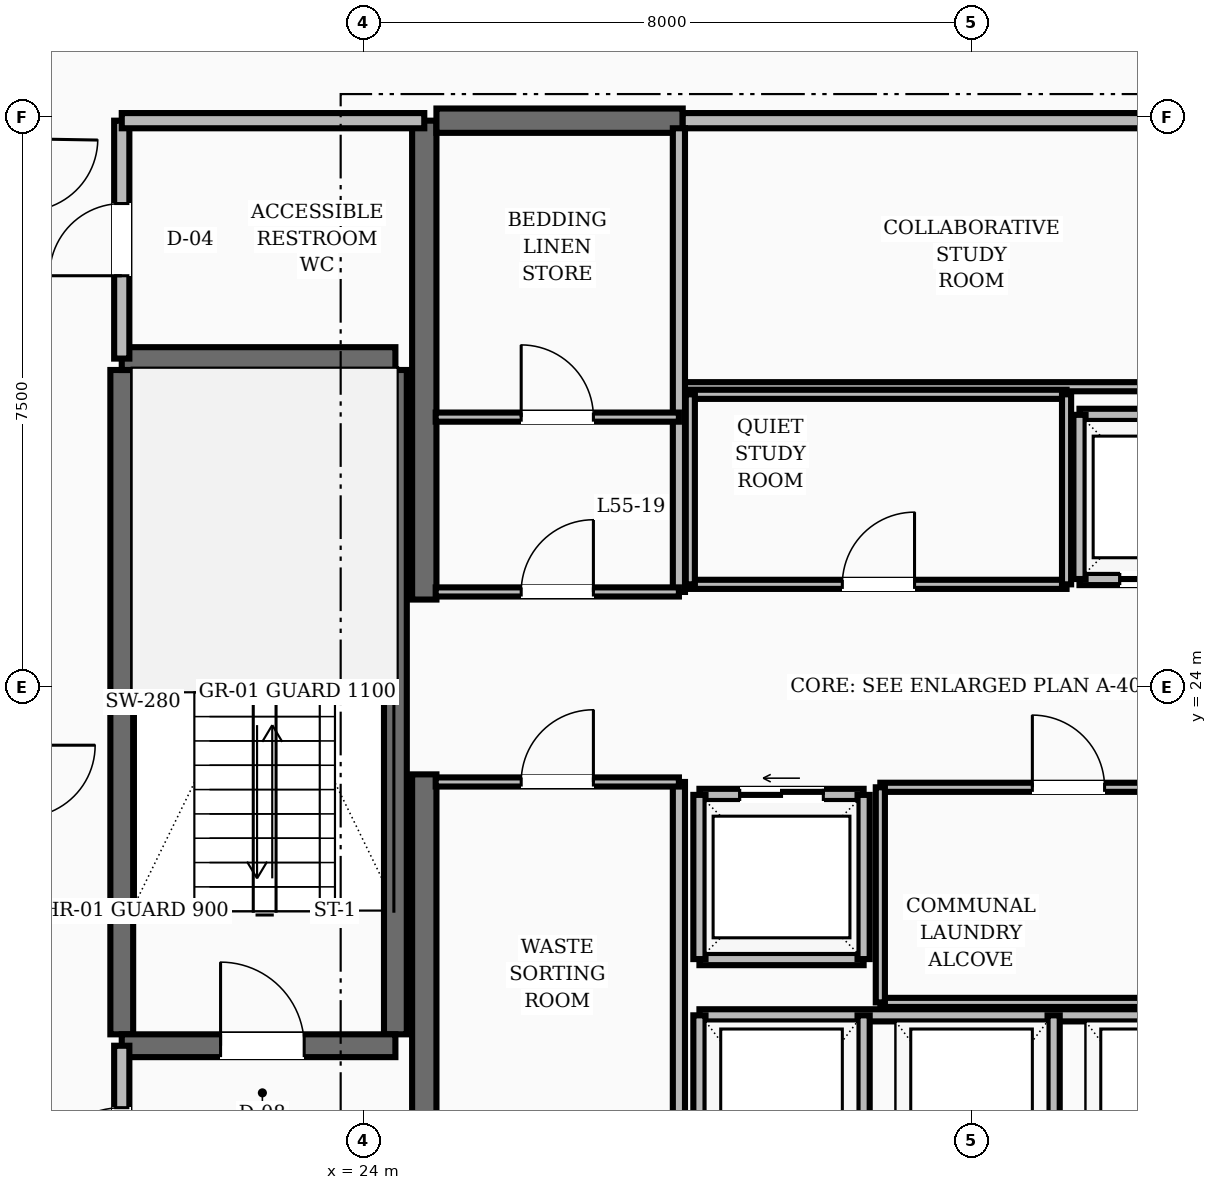
"""IFC4 building model, lengths in metres.
Left out: names, types, materials, properties, quantities, classifications, styles, units other than length and angle.
Written with IfcOpenShell. Run it as: python <this file> out.ifc"""

import sys

from ifc_helpers import new_model, si_unit, direction, frame, frame_2d, origin, place, context, subcontext, project, spatial, rectangle, extrude, element, fill, save


model = new_model("IFC4")
c1 = context("Model", 3, precision=1e-05, world=origin(), true_north=direction((0.0, 1.0)))
c2 = subcontext(c1, "Body", "Model", "MODEL_VIEW")
j1 = project(units=[si_unit("LENGTHUNIT", "METRE"), si_unit("PLANEANGLEUNIT", "RADIAN")], contexts=[c1])
p1 = place(None, origin())
s1 = spatial("IfcSite", under=j1, at=p1, CompositionType="ELEMENT")
p2 = place(p1, origin())
s2 = spatial("IfcBuilding", under=s1, at=p2, CompositionType="ELEMENT")
p3 = place(p2, frame((0.0, 0.0, 214.8)))
s3 = spatial("IfcBuildingStorey", under=s2, at=p3, CompositionType="ELEMENT", Elevation=214.8)
for number, where, z_axis, x_axis in (
    (1, (24.8, 16.55, 0.0), (0.0, 0.0, 1.0), (0.0, 1.0, 0.0)),
    (2, (24.8, 25.15, 0.0), (0.0, 0.0, 1.0), (0.0, 1.0, 0.0)),
):
    element("IfcWall", number, at=place(p3, frame(where, z_axis=z_axis, x_axis=x_axis)), inside=s3, PredefinedType="SHEAR", context=c2, shape_type="SweptSolid", body=[
        extrude(rectangle(XDim=6.3, YDim=0.32, at=frame_2d((3.15, 0.0))), origin(), (0.0, 0.0, 1.0), 3.6),
    ])
p4 = place(p3, frame((24.96, 31.45, 0.0), z_axis=(0.0, 0.0, 1.0), x_axis=(1.0, 0.0, 0.0)))
e3 = element("IfcWall", 3, at=p4, inside=s3, PredefinedType="SHEAR", context=c2, shape_type="SweptSolid", body=[
    extrude(rectangle(XDim=3.24, YDim=0.32, at=frame_2d((1.62, 0.0))), origin(), (0.0, 0.0, 1.0), 3.6),
])
for number, where, z_axis, x_axis in (
    (4, (20.82, 19.43, 0.0), (0.0, 0.0, 1.0), (0.0, 1.0, 0.0)),
    (5, (24.42, 19.43, 0.0), (0.0, 0.0, 1.0), (0.0, 1.0, 0.0)),
):
    element("IfcWall", number, at=place(p3, frame(where, z_axis=z_axis, x_axis=x_axis)), inside=s3, PredefinedType="SHEAR", context=c2, shape_type="SweptSolid", body=[
        extrude(rectangle(XDim=8.74, YDim=0.3, at=frame_2d((4.37, 0.0))), origin(), (0.0, 0.0, 1.0), 3.6),
    ])
p5 = place(p3, frame((20.82, 19.28, 0.0), z_axis=(0.0, 0.0, 1.0), x_axis=(1.0, 0.0, 0.0)))
e6 = element("IfcWall", 6, at=p5, inside=s3, PredefinedType="SHEAR", context=c2, shape_type="SweptSolid", body=[
    extrude(rectangle(XDim=3.6, YDim=0.3, at=frame_2d((1.8, 0.0))), origin(), (0.0, 0.0, 1.0), 3.6),
])
p6 = place(p5, frame((1.3, 0.0, 0.0)))
e7 = element("IfcOpeningElement", 7, at=p6, cuts=e6, PredefinedType="OPENING", context=c2, shape_type="SweptSolid", body=[
    extrude(rectangle(XDim=1.1, YDim=2.1, at=frame_2d((0.55, 1.05))), frame((0.0, 0.16, 0.0), z_axis=(0.0, -1.0, 0.0), x_axis=(1.0, 0.0, 0.0)), (0.0, 0.0, 1.0), 0.32),
])
p7 = place(p3, frame((20.82, 28.32, 0.0), z_axis=(0.0, 0.0, 1.0), x_axis=(1.0, 0.0, 0.0)))
e8 = element("IfcWall", 8, at=p7, inside=s3, PredefinedType="SHEAR", context=c2, shape_type="SweptSolid", body=[
    extrude(rectangle(XDim=3.6, YDim=0.3, at=frame_2d((1.8, 0.0))), origin(), (0.0, 0.0, 1.0), 3.6),
])
p8 = place(p3, frame((20.82, 16.55, 0.0), z_axis=(0.0, 0.0, 1.0), x_axis=(0.0, 1.0, 0.0)))
e9 = element("IfcWall", 9, at=p8, inside=s3, PredefinedType="SOLIDWALL", context=c2, shape_type="SweptSolid", body=[
    extrude(rectangle(XDim=2.73, YDim=0.2, at=frame_2d((1.365, 0.0))), origin(), (0.0, 0.0, 1.0), 2.87),
])
p9 = place(p8, frame((0.815, 0.0, 0.0)))
e10 = element("IfcOpeningElement", 10, at=p9, cuts=e9, PredefinedType="OPENING", context=c2, shape_type="SweptSolid", body=[
    extrude(rectangle(XDim=1.1, YDim=2.1, at=frame_2d((0.55, 1.05))), frame((0.0, 0.11, 0.0), z_axis=(0.0, -1.0, 0.0), x_axis=(1.0, 0.0, 0.0)), (0.0, 0.0, 1.0), 0.22),
])
p10 = place(p3, frame((20.82, 28.32, 0.0), z_axis=(0.0, 0.0, 1.0), x_axis=(0.0, 1.0, 0.0)))
e11 = element("IfcWall", 11, at=p10, inside=s3, PredefinedType="SOLIDWALL", context=c2, shape_type="SweptSolid", body=[
    extrude(rectangle(XDim=3.13, YDim=0.2, at=frame_2d((1.565, 0.0))), origin(), (0.0, 0.0, 1.0), 2.87),
])
p11 = place(p10, frame((1.09, 0.0, 0.0)))
e12 = element("IfcOpeningElement", 12, at=p11, cuts=e11, PredefinedType="OPENING", context=c2, shape_type="SweptSolid", body=[
    extrude(rectangle(XDim=0.95, YDim=2.1, at=frame_2d((0.475, 1.05))), frame((0.0, 0.11, 0.0), z_axis=(0.0, -1.0, 0.0), x_axis=(1.0, 0.0, 0.0)), (0.0, 0.0, 1.0), 0.22),
])
p12 = place(p3, frame((20.82, 31.45, 0.0), z_axis=(0.0, 0.0, 1.0), x_axis=(1.0, 0.0, 0.0)))
e13 = element("IfcWall", 13, at=p12, inside=s3, PredefinedType="SOLIDWALL", context=c2, shape_type="SweptSolid", body=[
    extrude(rectangle(XDim=3.98, YDim=0.2, at=frame_2d((1.99, 0.0))), origin(), (0.0, 0.0, 1.0), 2.87),
])
p13 = place(p3, frame((33.42, 25.42, 0.0), z_axis=(0.0, 0.0, 1.0), x_axis=(1.0, 0.0, 0.0)))
e14 = element("IfcWall", 14, at=p13, inside=s3, PredefinedType="SOLIDWALL", context=c2, shape_type="SweptSolid", body=[
    extrude(rectangle(XDim=2.16, YDim=0.16, at=frame_2d((1.08, 0.0))), origin(), (0.0, 0.0, 1.0), 2.87),
])
p14 = place(p13, frame((0.53, 0.0, 0.0)))
e15 = element("IfcOpeningElement", 15, at=p14, cuts=e14, PredefinedType="OPENING", context=c2, shape_type="SweptSolid", body=[
    extrude(rectangle(XDim=1.1, YDim=2.15, at=frame_2d((0.55, 1.075))), frame((0.0, 0.09, 0.0), z_axis=(0.0, -1.0, 0.0), x_axis=(1.0, 0.0, 0.0)), (0.0, 0.0, 1.0), 0.18),
])
for number, where, z_axis, x_axis in (
    (16, (33.42, 27.58, 0.0), (0.0, 0.0, 1.0), (1.0, 0.0, 0.0)),
    (17, (33.42, 25.42, 0.0), (0.0, 0.0, 1.0), (0.0, 1.0, 0.0)),
):
    element("IfcWall", number, at=place(p3, frame(where, z_axis=z_axis, x_axis=x_axis)), inside=s3, PredefinedType="SOLIDWALL", context=c2, shape_type="SweptSolid", body=[
        extrude(rectangle(XDim=2.16, YDim=0.16, at=frame_2d((1.08, 0.0))), origin(), (0.0, 0.0, 1.0), 2.87),
    ])
p15 = place(p3, frame((28.42, 22.58, 0.0), z_axis=(0.0, 0.0, 1.0), x_axis=(1.0, 0.0, 0.0)))
e18 = element("IfcWall", 18, at=p15, inside=s3, PredefinedType="SOLIDWALL", context=c2, shape_type="SweptSolid", body=[
    extrude(rectangle(XDim=2.16, YDim=0.16, at=frame_2d((1.08, 0.0))), origin(), (0.0, 0.0, 1.0), 2.87),
])
p16 = place(p15, frame((0.53, 0.0, 0.0)))
e19 = element("IfcOpeningElement", 19, at=p16, cuts=e18, PredefinedType="OPENING", context=c2, shape_type="SweptSolid", body=[
    extrude(rectangle(XDim=1.1, YDim=2.15, at=frame_2d((0.55, 1.075))), frame((0.0, 0.09, 0.0), z_axis=(0.0, -1.0, 0.0), x_axis=(1.0, 0.0, 0.0)), (0.0, 0.0, 1.0), 0.18),
])
for number, where, z_axis, x_axis in (
    (20, (28.42, 20.42, 0.0), (0.0, 0.0, 1.0), (1.0, 0.0, 0.0)),
    (21, (28.42, 20.42, 0.0), (0.0, 0.0, 1.0), (0.0, 1.0, 0.0)),
    (22, (30.58, 20.42, 0.0), (0.0, 0.0, 1.0), (0.0, 1.0, 0.0)),
):
    element("IfcWall", number, at=place(p3, frame(where, z_axis=z_axis, x_axis=x_axis)), inside=s3, PredefinedType="SOLIDWALL", context=c2, shape_type="SweptSolid", body=[
        extrude(rectangle(XDim=2.16, YDim=0.16, at=frame_2d((1.08, 0.0))), origin(), (0.0, 0.0, 1.0), 2.87),
    ])
p17 = place(p3, frame((28.42, 19.68, 0.0), z_axis=(0.0, 0.0, 1.0), x_axis=(1.0, 0.0, 0.0)))
e23 = element("IfcWall", 23, at=p17, inside=s3, PredefinedType="SOLIDWALL", context=c2, shape_type="SweptSolid", body=[
    extrude(rectangle(XDim=7.16, YDim=0.16, at=frame_2d((3.58, 0.0))), origin(), (0.0, 0.0, 1.0), 2.87),
])
for number, where, z_axis, x_axis in (
    (24, (28.42, 16.92, 0.0), (0.0, 0.0, 1.0), (0.0, 1.0, 0.0)),
    (25, (30.58, 16.92, 0.0), (0.0, 0.0, 1.0), (0.0, 1.0, 0.0)),
    (26, (33.08, 16.92, 0.0), (0.0, 0.0, 1.0), (0.0, 1.0, 0.0)),
):
    element("IfcWall", number, at=place(p3, frame(where, z_axis=z_axis, x_axis=x_axis)), inside=s3, PredefinedType="SOLIDWALL", context=c2, shape_type="SweptSolid", body=[
        extrude(rectangle(XDim=2.76, YDim=0.16, at=frame_2d((1.38, 0.0))), origin(), (0.0, 0.0, 1.0), 2.87),
    ])
p18 = place(p3, frame((28.2, 31.45, 0.0), z_axis=(0.0, 0.0, 1.0), x_axis=(1.0, 0.0, 0.0)))
e27 = element("IfcWall", 27, at=p18, inside=s3, PredefinedType="SOLIDWALL", context=c2, shape_type="SweptSolid", body=[
    extrude(rectangle(XDim=7.6, YDim=0.2, at=frame_2d((3.8, 0.0))), origin(), (0.0, 0.0, 1.0), 2.87),
])
p19 = place(p3, frame((28.2, 27.95, 0.0), z_axis=(0.0, 0.0, 1.0), x_axis=(1.0, 0.0, 0.0)))
e28 = element("IfcWall", 28, at=p19, inside=s3, PredefinedType="PARTITIONING", context=c2, shape_type="SweptSolid", body=[
    extrude(rectangle(XDim=7.6, YDim=0.12, at=frame_2d((3.8, 0.0))), origin(), (0.0, 0.0, 1.0), 2.87),
])
p20 = place(p3, frame((28.3, 25.35, 0.0), z_axis=(0.0, 0.0, 1.0), x_axis=(1.0, 0.0, 0.0)))
e29 = element("IfcWall", 29, at=p20, inside=s3, PredefinedType="PARTITIONING", context=c2, shape_type="SweptSolid", body=[
    extrude(rectangle(XDim=4.95, YDim=0.12, at=frame_2d((2.475, 0.0))), origin(), (0.0, 0.0, 1.0), 2.87),
])
p21 = place(p20, frame((2.0, 0.0, 0.0)))
e30 = element("IfcOpeningElement", 30, at=p21, cuts=e29, PredefinedType="OPENING", context=c2, shape_type="SweptSolid", body=[
    extrude(rectangle(XDim=0.95, YDim=2.1, at=frame_2d((0.475, 1.05))), frame((0.0, 0.07, 0.0), z_axis=(0.0, -1.0, 0.0), x_axis=(1.0, 0.0, 0.0)), (0.0, 0.0, 1.0), 0.14),
])
p22 = place(p3, frame((28.3, 27.85, 0.0), z_axis=(0.0, 0.0, 1.0), x_axis=(1.0, 0.0, 0.0)))
e31 = element("IfcWall", 31, at=p22, inside=s3, PredefinedType="PARTITIONING", context=c2, shape_type="SweptSolid", body=[
    extrude(rectangle(XDim=4.95, YDim=0.12, at=frame_2d((2.475, 0.0))), origin(), (0.0, 0.0, 1.0), 2.87),
])
for number, where, z_axis, x_axis in (
    (32, (28.3, 25.35, 0.0), (0.0, 0.0, 1.0), (0.0, 1.0, 0.0)),
    (33, (33.25, 25.35, 0.0), (0.0, 0.0, 1.0), (0.0, 1.0, 0.0)),
):
    element("IfcWall", number, at=place(p3, frame(where, z_axis=z_axis, x_axis=x_axis)), inside=s3, PredefinedType="PARTITIONING", context=c2, shape_type="SweptSolid", body=[
        extrude(rectangle(XDim=2.5, YDim=0.12, at=frame_2d((1.25, 0.0))), origin(), (0.0, 0.0, 1.0), 2.87),
    ])
p23 = place(p3, frame((30.8, 22.68, 0.0), z_axis=(0.0, 0.0, 1.0), x_axis=(1.0, 0.0, 0.0)))
e34 = element("IfcWall", 34, at=p23, inside=s3, PredefinedType="PARTITIONING", context=c2, shape_type="SweptSolid", body=[
    extrude(rectangle(XDim=4.95, YDim=0.12, at=frame_2d((2.475, 0.0))), origin(), (0.0, 0.0, 1.0), 2.87),
])
p24 = place(p23, frame((2.0, 0.0, 0.0)))
e35 = element("IfcOpeningElement", 35, at=p24, cuts=e34, PredefinedType="OPENING", context=c2, shape_type="SweptSolid", body=[
    extrude(rectangle(XDim=0.95, YDim=2.1, at=frame_2d((0.475, 1.05))), frame((0.0, 0.07, 0.0), z_axis=(0.0, -1.0, 0.0), x_axis=(1.0, 0.0, 0.0)), (0.0, 0.0, 1.0), 0.14),
])
p25 = place(p3, frame((30.8, 19.85, 0.0), z_axis=(0.0, 0.0, 1.0), x_axis=(1.0, 0.0, 0.0)))
e36 = element("IfcWall", 36, at=p25, inside=s3, PredefinedType="PARTITIONING", context=c2, shape_type="SweptSolid", body=[
    extrude(rectangle(XDim=4.95, YDim=0.12, at=frame_2d((2.475, 0.0))), origin(), (0.0, 0.0, 1.0), 2.87),
])
p26 = place(p3, frame((30.8, 19.85, 0.0), z_axis=(0.0, 0.0, 1.0), x_axis=(0.0, 1.0, 0.0)))
e37 = element("IfcWall", 37, at=p26, inside=s3, PredefinedType="PARTITIONING", context=c2, shape_type="SweptSolid", body=[
    extrude(rectangle(XDim=2.83, YDim=0.12, at=frame_2d((1.415, 0.0))), origin(), (0.0, 0.0, 1.0), 2.87),
])
p27 = place(p3, frame((28.15, 16.7, 0.0), z_axis=(0.0, 0.0, 1.0), x_axis=(0.0, 1.0, 0.0)))
e38 = element("IfcWall", 38, at=p27, inside=s3, PredefinedType="SOLIDWALL", context=c2, shape_type="SweptSolid", body=[
    extrude(rectangle(XDim=6.05, YDim=0.16, at=frame_2d((3.025, 0.0))), origin(), (0.0, 0.0, 1.0), 2.87),
])
p28 = place(p3, frame((28.15, 25.25, 0.0), z_axis=(0.0, 0.0, 1.0), x_axis=(0.0, 1.0, 0.0)))
e39 = element("IfcWall", 39, at=p28, inside=s3, PredefinedType="SOLIDWALL", context=c2, shape_type="SweptSolid", body=[
    extrude(rectangle(XDim=6.1, YDim=0.16, at=frame_2d((3.05, 0.0))), origin(), (0.0, 0.0, 1.0), 2.87),
])
p29 = place(p3, frame((24.95, 25.25, 0.0), z_axis=(0.0, 0.0, 1.0), x_axis=(1.0, 0.0, 0.0)))
e40 = element("IfcWall", 40, at=p29, inside=s3, PredefinedType="PARTITIONING", context=c2, shape_type="SweptSolid", body=[
    extrude(rectangle(XDim=3.2, YDim=0.12, at=frame_2d((1.6, 0.0))), origin(), (0.0, 0.0, 1.0), 2.87),
])
p30 = place(p29, frame((1.125, 0.0, 0.0)))
e41 = element("IfcOpeningElement", 41, at=p30, cuts=e40, PredefinedType="OPENING", context=c2, shape_type="SweptSolid", body=[
    extrude(rectangle(XDim=0.95, YDim=2.1, at=frame_2d((0.475, 1.05))), frame((0.0, 0.07, 0.0), z_axis=(0.0, -1.0, 0.0), x_axis=(1.0, 0.0, 0.0)), (0.0, 0.0, 1.0), 0.14),
])
p31 = place(p3, frame((24.95, 22.75, 0.0), z_axis=(0.0, 0.0, 1.0), x_axis=(1.0, 0.0, 0.0)))
e42 = element("IfcWall", 42, at=p31, inside=s3, PredefinedType="PARTITIONING", context=c2, shape_type="SweptSolid", body=[
    extrude(rectangle(XDim=3.2, YDim=0.12, at=frame_2d((1.6, 0.0))), origin(), (0.0, 0.0, 1.0), 2.87),
])
p32 = place(p31, frame((1.125, 0.0, 0.0)))
e43 = element("IfcOpeningElement", 43, at=p32, cuts=e42, PredefinedType="OPENING", context=c2, shape_type="SweptSolid", body=[
    extrude(rectangle(XDim=0.95, YDim=2.1, at=frame_2d((0.475, 1.05))), frame((0.0, 0.07, 0.0), z_axis=(0.0, -1.0, 0.0), x_axis=(1.0, 0.0, 0.0)), (0.0, 0.0, 1.0), 0.14),
])
p33 = place(p3, frame((24.95, 27.55, 0.0), z_axis=(0.0, 0.0, 1.0), x_axis=(1.0, 0.0, 0.0)))
e44 = element("IfcWall", 44, at=p33, inside=s3, PredefinedType="PARTITIONING", context=c2, shape_type="SweptSolid", body=[
    extrude(rectangle(XDim=3.2, YDim=0.12, at=frame_2d((1.6, 0.0))), origin(), (0.0, 0.0, 1.0), 2.87),
])
p34 = place(p33, frame((1.125, 0.0, 0.0)))
e45 = element("IfcOpeningElement", 45, at=p34, cuts=e44, PredefinedType="OPENING", context=c2, shape_type="SweptSolid", body=[
    extrude(rectangle(XDim=0.95, YDim=2.1, at=frame_2d((0.475, 1.05))), frame((0.0, 0.07, 0.0), z_axis=(0.0, -1.0, 0.0), x_axis=(1.0, 0.0, 0.0)), (0.0, 0.0, 1.0), 0.14),
])
p35 = place(p3, frame((21.635, 34.365, 0.0), z_axis=(0.0, 0.0, 1.0), x_axis=(-0.707106781187, -0.707106781187, 0.0)))
e46 = element("IfcWall", 46, at=p35, inside=s3, PredefinedType="SOLIDWALL", context=c2, shape_type="SweptSolid", body=[
    extrude(rectangle(XDim=2.916, YDim=0.16, at=frame_2d((1.458, 0.0))), origin(), (0.0, 0.0, 1.0), 2.87),
])
p36 = place(p6, origin())
e47 = element("IfcDoor", 47, at=p36, inside=s3, OperationType="SINGLE_SWING_LEFT", PredefinedType="DOOR", context=c2, shape_type="SweptSolid", body=[
    extrude(rectangle(XDim=1.1, YDim=2.1, at=frame_2d((0.55, 1.05))), frame((0.0, 0.025, 0.0), z_axis=(0.0, -1.0, 0.0), x_axis=(1.0, 0.0, 0.0)), (0.0, 0.0, 1.0), 0.05),
])
fill(e7, e47)
p37 = place(p9, origin())
e48 = element("IfcDoor", 48, at=p37, inside=s3, OperationType="SINGLE_SWING_LEFT", PredefinedType="DOOR", context=c2, shape_type="SweptSolid", body=[
    extrude(rectangle(XDim=1.1, YDim=2.1, at=frame_2d((0.55, 1.05))), frame((0.0, 0.025, 0.0), z_axis=(0.0, -1.0, 0.0), x_axis=(1.0, 0.0, 0.0)), (0.0, 0.0, 1.0), 0.05),
])
fill(e10, e48)
p38 = place(p11, origin())
e49 = element("IfcDoor", 49, at=p38, inside=s3, OperationType="SINGLE_SWING_LEFT", PredefinedType="DOOR", context=c2, shape_type="SweptSolid", body=[
    extrude(rectangle(XDim=0.95, YDim=2.1, at=frame_2d((0.475, 1.05))), frame((0.0, 0.025, 0.0), z_axis=(0.0, -1.0, 0.0), x_axis=(1.0, 0.0, 0.0)), (0.0, 0.0, 1.0), 0.05),
])
fill(e12, e49)
p39 = place(p14, origin())
e50 = element("IfcDoor", 50, at=p39, inside=s3, OperationType="SLIDING_TO_RIGHT", PredefinedType="DOOR", context=c2, shape_type="SweptSolid", body=[
    extrude(rectangle(XDim=1.1, YDim=2.15, at=frame_2d((0.55, 1.075))), frame((0.0, 0.025, 0.0), z_axis=(0.0, -1.0, 0.0), x_axis=(1.0, 0.0, 0.0)), (0.0, 0.0, 1.0), 0.05),
])
fill(e15, e50)
p40 = place(p16, origin())
e51 = element("IfcDoor", 51, at=p40, inside=s3, OperationType="SLIDING_TO_LEFT", PredefinedType="DOOR", context=c2, shape_type="SweptSolid", body=[
    extrude(rectangle(XDim=1.1, YDim=2.15, at=frame_2d((0.55, 1.075))), frame((0.0, 0.025, 0.0), z_axis=(0.0, -1.0, 0.0), x_axis=(1.0, 0.0, 0.0)), (0.0, 0.0, 1.0), 0.05),
])
fill(e19, e51)
p41 = place(p21, origin())
e52 = element("IfcDoor", 52, at=p41, inside=s3, OperationType="SINGLE_SWING_RIGHT", PredefinedType="DOOR", context=c2, shape_type="SweptSolid", body=[
    extrude(rectangle(XDim=0.95, YDim=2.1, at=frame_2d((0.475, 1.05))), frame((0.0, 0.025, 0.0), z_axis=(0.0, -1.0, 0.0), x_axis=(1.0, 0.0, 0.0)), (0.0, 0.0, 1.0), 0.05),
])
fill(e30, e52)
p42 = place(p24, origin())
e53 = element("IfcDoor", 53, at=p42, inside=s3, OperationType="SINGLE_SWING_LEFT", PredefinedType="DOOR", context=c2, shape_type="SweptSolid", body=[
    extrude(rectangle(XDim=0.95, YDim=2.1, at=frame_2d((0.475, 1.05))), frame((0.0, 0.025, 0.0), z_axis=(0.0, -1.0, 0.0), x_axis=(1.0, 0.0, 0.0)), (0.0, 0.0, 1.0), 0.05),
])
fill(e35, e53)
p43 = place(p30, origin())
e54 = element("IfcDoor", 54, at=p43, inside=s3, OperationType="SINGLE_SWING_RIGHT", PredefinedType="DOOR", context=c2, shape_type="SweptSolid", body=[
    extrude(rectangle(XDim=0.95, YDim=2.1, at=frame_2d((0.475, 1.05))), frame((0.0, 0.025, 0.0), z_axis=(0.0, -1.0, 0.0), x_axis=(1.0, 0.0, 0.0)), (0.0, 0.0, 1.0), 0.05),
])
fill(e41, e54)
p44 = place(p34, origin())
e55 = element("IfcDoor", 55, at=p44, inside=s3, OperationType="SINGLE_SWING_LEFT", PredefinedType="DOOR", context=c2, shape_type="SweptSolid", body=[
    extrude(rectangle(XDim=0.95, YDim=2.1, at=frame_2d((0.475, 1.05))), frame((0.0, 0.025, 0.0), z_axis=(0.0, -1.0, 0.0), x_axis=(1.0, 0.0, 0.0)), (0.0, 0.0, 1.0), 0.05),
])
fill(e45, e55)
p45 = place(p32, origin())
e56 = element("IfcDoor", 56, at=p45, inside=s3, OperationType="SINGLE_SWING_RIGHT", PredefinedType="DOOR", context=c2, shape_type="SweptSolid", body=[
    extrude(rectangle(XDim=0.95, YDim=2.1, at=frame_2d((0.475, 1.05))), frame((0.0, 0.025, 0.0), z_axis=(0.0, -1.0, 0.0), x_axis=(1.0, 0.0, 0.0)), (0.0, 0.0, 1.0), 0.05),
])
fill(e43, e56)
save(model, sys.argv[1])
